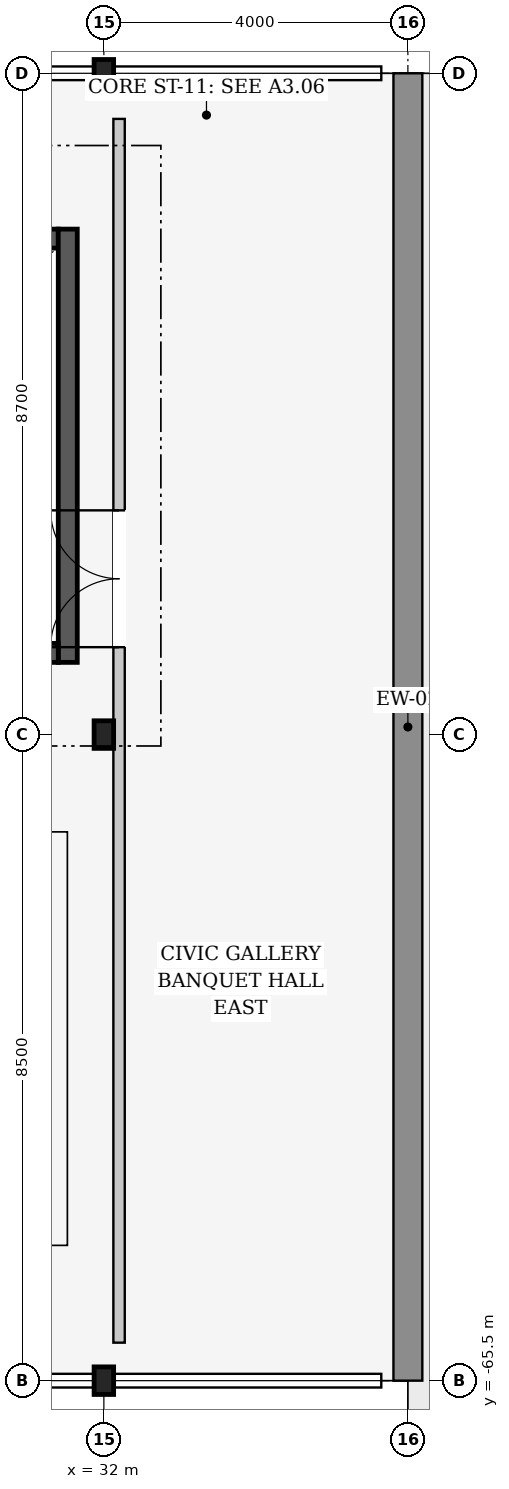
"""IFC4 building model, lengths in metres.
Left out: names, types, materials, properties, quantities, classifications, styles, units other than length and angle.
Written with IfcOpenShell. Run it as: python <this file> out.ifc"""

import sys

from ifc_helpers import new_model, si_unit, direction, frame, frame_2d, origin, origin_2d, place, context, subcontext, project, spatial, rectangle, i_section, extrude, element, fill, save


model = new_model("IFC4")
c1 = context("Model", 3, precision=1e-05, world=origin(), true_north=direction((0.0, 1.0)))
c2 = subcontext(c1, "Body", "Model", "MODEL_VIEW")
j1 = project(units=[si_unit("LENGTHUNIT", "METRE"), si_unit("PLANEANGLEUNIT", "RADIAN")], contexts=[c1])
p1 = place(None, origin())
s1 = spatial("IfcSite", under=j1, at=p1, CompositionType="ELEMENT")
p2 = place(p1, origin())
s2 = spatial("IfcBuilding", under=s1, at=p2, CompositionType="ELEMENT")
p3 = place(p2, frame((0.0, 0.0, 16.2)))
s3 = spatial("IfcBuildingStorey", under=s2, at=p3, CompositionType="ELEMENT", Elevation=16.2)
for number, where, z_axis, x_axis in (
    (1, (32.0, -65.5, 0.0), (0.0, 0.0, 1.0), (1.0, 0.0, 0.0)),
    (2, (32.0, -57.0, 0.0), (0.0, 0.0, 1.0), (1.0, 0.0, 0.0)),
    (3, (32.0, -48.3, 0.0), (0.0, 0.0, 1.0), (1.0, 0.0, 0.0)),
):
    element("IfcColumn", number, at=place(p3, frame(where, z_axis=z_axis, x_axis=x_axis)), inside=s3, PredefinedType="COLUMN", context=c2, shape_type="SweptSolid", body=[
        extrude(i_section(OverallWidth=0.257, OverallDepth=0.363, WebThickness=0.013, FlangeThickness=0.022, at=origin_2d()), origin(), (0.0, 0.0, 1.0), 4.8),
    ])
p4 = place(p3, frame((36.0, -48.3, 0.0), z_axis=(0.0, 0.0, 1.0), x_axis=(0.0, -1.0, 0.0)))
e4 = element("IfcWall", 4, at=p4, inside=s3, PredefinedType="SOLIDWALL", context=c2, shape_type="SweptSolid", body=[
    extrude(rectangle(XDim=17.2, YDim=0.38, at=frame_2d((8.6, 0.0))), origin(), (0.0, 0.0, 1.0), 5.8),
])
p5 = place(p3, frame((21.2, -50.475, 0.0), z_axis=(0.0, 0.0, 1.0), x_axis=(1.0, 0.0, 0.0)))
e5 = element("IfcWall", 5, at=p5, inside=s3, PredefinedType="SHEAR", context=c2, shape_type="SweptSolid", body=[
    extrude(rectangle(XDim=10.2, YDim=0.25, at=frame_2d((5.1, 0.0))), origin(), (0.0, 0.0, 1.0), 3.6),
])
p6 = place(p3, frame((31.525, -50.35, 0.0), z_axis=(0.0, 0.0, 1.0), x_axis=(0.0, -1.0, 0.0)))
e6 = element("IfcWall", 6, at=p6, inside=s3, PredefinedType="SHEAR", context=c2, shape_type="SweptSolid", body=[
    extrude(rectangle(XDim=5.7, YDim=0.25, at=frame_2d((2.85, 0.0))), origin(), (0.0, 0.0, 1.0), 3.6),
])
p7 = place(p3, frame((31.4, -55.925, 0.0), z_axis=(0.0, 0.0, 1.0), x_axis=(-1.0, 0.0, 0.0)))
e7 = element("IfcWall", 7, at=p7, inside=s3, PredefinedType="SHEAR", context=c2, shape_type="SweptSolid", body=[
    extrude(rectangle(XDim=10.2, YDim=0.25, at=frame_2d((5.1, 0.0))), origin(), (0.0, 0.0, 1.0), 3.6),
])
p8 = place(p3, frame((32.2, -65.0, 0.0), z_axis=(0.0, 0.0, 1.0), x_axis=(0.0, 1.0, 0.0)))
e8 = element("IfcWall", 8, at=p8, inside=s3, PredefinedType="PARTITIONING", context=c2, shape_type="SweptSolid", body=[
    extrude(rectangle(XDim=16.1, YDim=0.15, at=frame_2d((8.05, 0.0))), origin(), (0.0, 0.0, 1.0), 3.605),
])
p9 = place(p8, frame((9.15, 0.0, 0.0)))
e9 = element("IfcOpeningElement", 9, at=p9, cuts=e8, PredefinedType="OPENING", context=c2, shape_type="SweptSolid", body=[
    extrude(rectangle(XDim=1.8, YDim=2.2, at=frame_2d((0.9, 1.1))), frame((0.0, 0.085, 0.0), z_axis=(0.0, -1.0, 0.0), x_axis=(1.0, 0.0, 0.0)), (0.0, 0.0, 1.0), 0.17),
])
p10 = place(p9, origin())
e10 = element("IfcDoor", 10, at=p10, inside=s3, OperationType="DOUBLE_DOOR_SINGLE_SWING", PredefinedType="DOOR", context=c2, shape_type="SweptSolid", body=[
    extrude(rectangle(XDim=1.8, YDim=2.2, at=frame_2d((0.9, 1.1))), frame((0.0, 0.025, 0.0), z_axis=(0.0, -1.0, 0.0), x_axis=(1.0, 0.0, 0.0)), (0.0, 0.0, 1.0), 0.05),
])
fill(e9, e10)
save(model, sys.argv[1])
